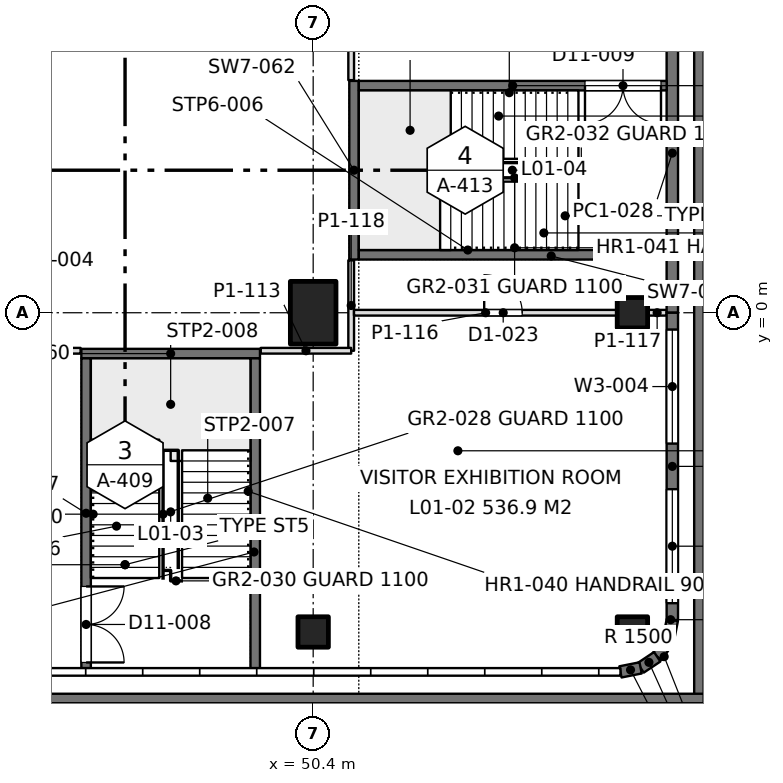
"""IFC4 building model, lengths in metres.
Left out: names, types, materials, properties, quantities, classifications, styles, units other than length and angle.
Written with IfcOpenShell. Run it as: python <this file> out.ifc"""

import sys

from ifc_helpers import new_model, si_unit, direction, frame, frame_2d, origin, origin_2d, place, context, subcontext, project, spatial, rectangle, extrude, element, fill, save


model = new_model("IFC4")
c1 = context("Model", 3, precision=1e-05, world=origin(), true_north=direction((0.0, 1.0)))
c2 = subcontext(c1, "Body", "Model", "MODEL_VIEW")
j1 = project(units=[si_unit("LENGTHUNIT", "METRE"), si_unit("PLANEANGLEUNIT", "RADIAN")], contexts=[c1])
p1 = place(None, origin())
s1 = spatial("IfcSite", under=j1, at=p1, CompositionType="ELEMENT")
p2 = place(p1, origin())
s2 = spatial("IfcBuilding", under=s1, at=p2, CompositionType="ELEMENT")
p3 = place(p2, frame((0.0, 0.0, 5.4)))
s3 = spatial("IfcBuildingStorey", under=s2, at=p3, CompositionType="ELEMENT", Elevation=5.4)
p4 = place(p3, frame((50.4, -8.4, 0.0), z_axis=(0.0, 0.0, 1.0), x_axis=(1.0, 0.0, 0.0)))
e1 = element("IfcColumn", 1, at=p4, inside=s3, PredefinedType="COLUMN", context=c2, shape_type="SweptSolid", body=[
    extrude(rectangle(XDim=0.8, YDim=0.8, at=origin_2d()), origin(), (0.0, 0.0, 1.0), 4.5),
])
p5 = place(p3, frame((50.4, 0.0, 0.0), z_axis=(0.0, 0.0, 1.0), x_axis=(1.0, 0.0, 0.0)))
e2 = element("IfcColumn", 2, at=p5, inside=s3, PredefinedType="COLUMN", context=c2, shape_type="SweptSolid", body=[
    extrude(rectangle(XDim=1.2, YDim=1.65, at=origin_2d()), origin(), (0.0, 0.0, 1.0), 4.5),
])
for number, where, z_axis, x_axis in (
    (3, (58.8, -8.4, 0.0), (0.0, 0.0, 1.0), (1.0, 0.0, 0.0)),
    (4, (58.8, 0.0, 0.0), (0.0, 0.0, 1.0), (1.0, 0.0, 0.0)),
):
    element("IfcColumn", number, at=place(p3, frame(where, z_axis=z_axis, x_axis=x_axis)), inside=s3, PredefinedType="COLUMN", context=c2, shape_type="SweptSolid", body=[
        extrude(rectangle(XDim=0.8, YDim=0.8, at=origin_2d()), origin(), (0.0, 0.0, 1.0), 4.5),
    ])
p6 = place(p3, frame((59.85, 8.4, 0.0), z_axis=(0.0, 0.0, 1.0), x_axis=(0.0, -1.0, 0.0)))
e5 = element("IfcWall", 5, at=p6, inside=s3, PredefinedType="SOLIDWALL", context=c2, shape_type="SweptSolid", body=[
    extrude(rectangle(XDim=8.4, YDim=0.3, at=frame_2d((4.2, 0.0))), origin(), (0.0, 0.0, 1.0), 4.3),
])
p7 = place(p3, frame((59.85, 0.0, 0.0), z_axis=(0.0, 0.0, 1.0), x_axis=(0.0, -1.0, 0.0)))
e6 = element("IfcWall", 6, at=p7, inside=s3, PredefinedType="SOLIDWALL", context=c2, shape_type="SweptSolid", body=[
    extrude(rectangle(XDim=8.085, YDim=0.3, at=frame_2d((4.042, 0.0))), origin(), (0.0, 0.0, 1.0), 4.3),
])
p8 = place(p7, frame((0.443, 0.0, 0.9)))
e7 = element("IfcOpeningElement", 7, at=p8, cuts=e6, PredefinedType="OPENING", context=c2, shape_type="SweptSolid", body=[
    extrude(rectangle(XDim=3.0, YDim=2.4, at=frame_2d((1.5, 1.2))), frame((0.0, 0.16, 0.0), z_axis=(0.0, -1.0, 0.0), x_axis=(1.0, 0.0, 0.0)), (0.0, 0.0, 1.0), 0.32),
])
p9 = place(p7, frame((4.643, 0.0, 0.9)))
e8 = element("IfcOpeningElement", 8, at=p9, cuts=e6, PredefinedType="OPENING", context=c2, shape_type="SweptSolid", body=[
    extrude(rectangle(XDim=3.0, YDim=2.4, at=frame_2d((1.5, 1.2))), frame((0.0, 0.16, 0.0), z_axis=(0.0, -1.0, 0.0), x_axis=(1.0, 0.0, 0.0)), (0.0, 0.0, 1.0), 0.32),
])
p10 = place(p3, frame((59.85, -8.085, 0.0), z_axis=(0.0, 0.0, 1.0), x_axis=(-0.1955082817, -0.980702050465, 0.0)))
e9 = element("IfcWall", 9, at=p10, inside=s3, PredefinedType="SOLIDWALL", context=c2, shape_type="SweptSolid", body=[
    extrude(rectangle(XDim=0.541, YDim=0.3, at=frame_2d((0.271, 0.0))), origin(), (0.0, 0.0, 1.0), 4.3),
])
p11 = place(p3, frame((59.744, -8.615, 0.0), z_axis=(0.0, 0.0, 1.0), x_axis=(-0.555236195849, -0.831692711774, 0.0)))
e10 = element("IfcWall", 10, at=p11, inside=s3, PredefinedType="SOLIDWALL", context=c2, shape_type="SweptSolid", body=[
    extrude(rectangle(XDim=0.525, YDim=0.3, at=frame_2d((0.263, 0.0))), origin(), (0.0, 0.0, 1.0), 4.3),
])
p12 = place(p3, frame((59.453, -9.052, 0.0), z_axis=(0.0, 0.0, 1.0), x_axis=(-0.831621430339, -0.55534295404, 0.0)))
e11 = element("IfcWall", 11, at=p12, inside=s3, PredefinedType="SOLIDWALL", context=c2, shape_type="SweptSolid", body=[
    extrude(rectangle(XDim=0.526, YDim=0.3, at=frame_2d((0.263, 0.0))), origin(), (0.0, 0.0, 1.0), 4.3),
])
p13 = place(p3, frame((59.015, -9.344, 0.0), z_axis=(0.0, 0.0, 1.0), x_axis=(-0.980788534345, -0.195073962632, 0.0)))
e12 = element("IfcWall", 12, at=p13, inside=s3, PredefinedType="SOLIDWALL", context=c2, shape_type="SweptSolid", body=[
    extrude(rectangle(XDim=0.541, YDim=0.3, at=frame_2d((0.271, 0.0))), origin(), (0.0, 0.0, 1.0), 4.3),
])
for number, where, z_axis, x_axis in (
    (13, (60.55, 60.675, 0.0), (0.0, 0.0, 1.0), (0.0, -1.0, 0.0)),
    (14, (60.675, -10.15, 0.0), (0.0, 0.0, 1.0), (-1.0, 0.0, 0.0)),
):
    element("IfcWall", number, at=place(p3, frame(where, z_axis=z_axis, x_axis=x_axis)), inside=s3, PredefinedType="PARAPET", context=c2, shape_type="SweptSolid", body=[
        extrude(rectangle(XDim=70.95, YDim=0.25, at=frame_2d((35.475, 0.0))), origin(), (0.0, 0.0, 1.0), 1.1),
    ])
p14 = place(p3, frame((6.12, -1.0, 0.0), z_axis=(0.0, 0.0, 1.0), x_axis=(1.0, 0.0, 0.0)))
e15 = element("IfcWall", 15, at=p14, inside=s3, PredefinedType="PARTITIONING", context=c2, shape_type="SweptSolid", body=[
    extrude(rectangle(XDim=38.16, YDim=0.15, at=frame_2d((19.08, 0.0))), origin(), (0.0, 0.0, 1.0), 3.7),
])
p15 = place(p14, frame((13.98, 0.0, 0.0)))
e16 = element("IfcOpeningElement", 16, at=p15, cuts=e15, PredefinedType="OPENING", context=c2, shape_type="SweptSolid", body=[
    extrude(rectangle(XDim=1.8, YDim=2.2, at=frame_2d((0.9, 1.1))), frame((0.0, 0.085, 0.0), z_axis=(0.0, -1.0, 0.0), x_axis=(1.0, 0.0, 0.0)), (0.0, 0.0, 1.0), 0.17),
])
p16 = place(p14, frame((22.38, 0.0, 0.0)))
e17 = element("IfcOpeningElement", 17, at=p16, cuts=e15, PredefinedType="OPENING", context=c2, shape_type="SweptSolid", body=[
    extrude(rectangle(XDim=1.8, YDim=2.2, at=frame_2d((0.9, 1.1))), frame((0.0, 0.085, 0.0), z_axis=(0.0, -1.0, 0.0), x_axis=(1.0, 0.0, 0.0)), (0.0, 0.0, 1.0), 0.17),
])
p17 = place(p3, frame((49.02, -1.0, 0.0), z_axis=(0.0, 0.0, 1.0), x_axis=(1.0, 0.0, 0.0)))
e18 = element("IfcWall", 18, at=p17, inside=s3, PredefinedType="PARTITIONING", context=c2, shape_type="SweptSolid", body=[
    extrude(rectangle(XDim=2.38, YDim=0.15, at=frame_2d((1.19, 0.0))), origin(), (0.0, 0.0, 1.0), 3.7),
])
p18 = place(p3, frame((51.474, 0.0, 0.0), z_axis=(0.0, 0.0, 1.0), x_axis=(1.0, 0.0, 0.0)))
e19 = element("IfcWall", 19, at=p18, inside=s3, PredefinedType="PARTITIONING", context=c2, shape_type="SweptSolid", body=[
    extrude(rectangle(XDim=6.927, YDim=0.15, at=frame_2d((3.463, 0.0))), origin(), (0.0, 0.0, 1.0), 3.7),
])
p19 = place(p18, frame((3.426, 0.0, 0.0)))
e20 = element("IfcOpeningElement", 20, at=p19, cuts=e19, PredefinedType="OPENING", context=c2, shape_type="SweptSolid", body=[
    extrude(rectangle(XDim=1.0, YDim=2.2, at=frame_2d((0.5, 1.1))), frame((0.0, 0.085, 0.0), z_axis=(0.0, -1.0, 0.0), x_axis=(1.0, 0.0, 0.0)), (0.0, 0.0, 1.0), 0.17),
])
p20 = place(p3, frame((59.199, 0.0, 0.0), z_axis=(0.0, 0.0, 1.0), x_axis=(1.0, 0.0, 0.0)))
e21 = element("IfcWall", 21, at=p20, inside=s3, PredefinedType="PARTITIONING", context=c2, shape_type="SweptSolid", body=[
    extrude(rectangle(XDim=0.503, YDim=0.15, at=frame_2d((0.251, 0.0))), origin(), (0.0, 0.0, 1.0), 4.3),
])
p21 = place(p3, frame((51.4, -1.0, 0.0), z_axis=(0.0, 0.0, 1.0), x_axis=(0.0, 1.0, 0.0)))
e22 = element("IfcWall", 22, at=p21, inside=s3, PredefinedType="PARTITIONING", context=c2, shape_type="SweptSolid", body=[
    extrude(rectangle(XDim=2.38, YDim=0.15, at=frame_2d((1.19, 0.0))), origin(), (0.0, 0.0, 1.0), 3.7),
])
p22 = place(p3, frame((51.4, 6.12, 0.0), z_axis=(0.0, 0.0, 1.0), x_axis=(0.0, 1.0, 0.0)))
e23 = element("IfcWall", 23, at=p22, inside=s3, PredefinedType="PARTITIONING", context=c2, shape_type="SweptSolid", body=[
    extrude(rectangle(XDim=6.482, YDim=0.15, at=frame_2d((3.241, 0.0))), origin(), (0.0, 0.0, 1.0), 3.7),
])
p23 = place(p22, frame((3.88, 0.0, 0.0)))
e24 = element("IfcOpeningElement", 24, at=p23, cuts=e23, PredefinedType="OPENING", context=c2, shape_type="SweptSolid", body=[
    extrude(rectangle(XDim=1.0, YDim=2.2, at=frame_2d((0.5, 1.1))), frame((0.0, 0.085, 0.0), z_axis=(0.0, -1.0, 0.0), x_axis=(1.0, 0.0, 0.0)), (0.0, 0.0, 1.0), 0.17),
])
p24 = place(p3, frame((44.425, -9.352, 0.0), z_axis=(0.0, 0.0, 1.0), x_axis=(0.0, 1.0, 0.0)))
e25 = element("IfcWall", 25, at=p24, inside=s3, PredefinedType="SOLIDWALL", context=c2, shape_type="SweptSolid", body=[
    extrude(rectangle(XDim=8.152, YDim=0.25, at=frame_2d((4.076, 0.0))), origin(), (0.0, 0.0, 1.0), 4.5),
])
p25 = place(p24, frame((0.15, 0.0, 0.0)))
e26 = element("IfcOpeningElement", 26, at=p25, cuts=e25, PredefinedType="OPENING", context=c2, shape_type="SweptSolid", body=[
    extrude(rectangle(XDim=2.0, YDim=2.2, at=frame_2d((1.0, 1.1))), frame((0.0, 0.135, 0.0), z_axis=(0.0, -1.0, 0.0), x_axis=(1.0, 0.0, 0.0)), (0.0, 0.0, 1.0), 0.27),
])
p26 = place(p3, frame((48.875, -9.352, 0.0), z_axis=(0.0, 0.0, 1.0), x_axis=(0.0, 1.0, 0.0)))
e27 = element("IfcWall", 27, at=p26, inside=s3, PredefinedType="SOLIDWALL", context=c2, shape_type="SweptSolid", body=[
    extrude(rectangle(XDim=8.152, YDim=0.25, at=frame_2d((4.076, 0.0))), origin(), (0.0, 0.0, 1.0), 4.5),
])
p27 = place(p3, frame((44.3, -1.075, 0.0), z_axis=(0.0, 0.0, 1.0), x_axis=(1.0, 0.0, 0.0)))
e28 = element("IfcWall", 28, at=p27, inside=s3, PredefinedType="SOLIDWALL", context=c2, shape_type="SweptSolid", body=[
    extrude(rectangle(XDim=4.7, YDim=0.25, at=frame_2d((2.35, 0.0))), origin(), (0.0, 0.0, 1.0), 4.5),
])
p28 = place(p3, frame((59.702, 1.525, 0.0), z_axis=(0.0, 0.0, 1.0), x_axis=(-1.0, 0.0, 0.0)))
e29 = element("IfcWall", 29, at=p28, inside=s3, PredefinedType="SOLIDWALL", context=c2, shape_type="SweptSolid", body=[
    extrude(rectangle(XDim=8.102, YDim=0.25, at=frame_2d((4.051, 0.0))), origin(), (0.0, 0.0, 1.0), 4.5),
])
p29 = place(p3, frame((59.702, 5.975, 0.0), z_axis=(0.0, 0.0, 1.0), x_axis=(-1.0, 0.0, 0.0)))
e30 = element("IfcWall", 30, at=p29, inside=s3, PredefinedType="SOLIDWALL", context=c2, shape_type="SweptSolid", body=[
    extrude(rectangle(XDim=8.102, YDim=0.25, at=frame_2d((4.051, 0.0))), origin(), (0.0, 0.0, 1.0), 4.5),
])
p30 = place(p29, frame((0.15, 0.0, 0.0)))
e31 = element("IfcOpeningElement", 31, at=p30, cuts=e30, PredefinedType="OPENING", context=c2, shape_type="SweptSolid", body=[
    extrude(rectangle(XDim=2.0, YDim=2.2, at=frame_2d((1.0, 1.1))), frame((0.0, 0.135, 0.0), z_axis=(0.0, -1.0, 0.0), x_axis=(1.0, 0.0, 0.0)), (0.0, 0.0, 1.0), 0.27),
])
p31 = place(p3, frame((51.475, 1.4, 0.0), z_axis=(0.0, 0.0, 1.0), x_axis=(0.0, 1.0, 0.0)))
e32 = element("IfcWall", 32, at=p31, inside=s3, PredefinedType="SOLIDWALL", context=c2, shape_type="SweptSolid", body=[
    extrude(rectangle(XDim=4.7, YDim=0.25, at=frame_2d((2.35, 0.0))), origin(), (0.0, 0.0, 1.0), 4.5),
])
p32 = place(p8, origin())
e33 = element("IfcWindow", 33, at=p32, inside=s3, PartitioningType="SINGLE_PANEL", PredefinedType="WINDOW", context=c2, shape_type="SweptSolid", body=[
    extrude(rectangle(XDim=3.0, YDim=2.4, at=frame_2d((1.5, 1.2))), frame((0.0, 0.03, 0.0), z_axis=(0.0, -1.0, 0.0), x_axis=(1.0, 0.0, 0.0)), (0.0, 0.0, 1.0), 0.06),
])
fill(e7, e33)
p33 = place(p9, origin())
e34 = element("IfcWindow", 34, at=p33, inside=s3, PartitioningType="SINGLE_PANEL", PredefinedType="WINDOW", context=c2, shape_type="SweptSolid", body=[
    extrude(rectangle(XDim=3.0, YDim=2.4, at=frame_2d((1.5, 1.2))), frame((0.0, 0.03, 0.0), z_axis=(0.0, -1.0, 0.0), x_axis=(1.0, 0.0, 0.0)), (0.0, 0.0, 1.0), 0.06),
])
fill(e8, e34)
p34 = place(p19, origin())
e35 = element("IfcDoor", 35, at=p34, inside=s3, OperationType="SINGLE_SWING_LEFT", PredefinedType="DOOR", context=c2, shape_type="SweptSolid", body=[
    extrude(rectangle(XDim=1.0, YDim=2.2, at=frame_2d((0.5, 1.1))), frame((0.0, 0.025, 0.0), z_axis=(0.0, -1.0, 0.0), x_axis=(1.0, 0.0, 0.0)), (0.0, 0.0, 1.0), 0.05),
])
fill(e20, e35)
p35 = place(p25, frame((2.0, 0.0, 0.0), z_axis=(0.0, 0.0, 1.0), x_axis=(-1.0, 0.0, 0.0)))
e36 = element("IfcDoor", 36, at=p35, inside=s3, OperationType="DOUBLE_DOOR_SINGLE_SWING", PredefinedType="DOOR", context=c2, shape_type="SweptSolid", body=[
    extrude(rectangle(XDim=2.0, YDim=2.2, at=frame_2d((1.0, 1.1))), frame((0.0, 0.025, 0.0), z_axis=(0.0, -1.0, 0.0), x_axis=(1.0, 0.0, 0.0)), (0.0, 0.0, 1.0), 0.05),
])
fill(e26, e36)
p36 = place(p30, origin())
e37 = element("IfcDoor", 37, at=p36, inside=s3, OperationType="DOUBLE_DOOR_SINGLE_SWING", PredefinedType="DOOR", context=c2, shape_type="SweptSolid", body=[
    extrude(rectangle(XDim=2.0, YDim=2.2, at=frame_2d((1.0, 1.1))), frame((0.0, 0.025, 0.0), z_axis=(0.0, -1.0, 0.0), x_axis=(1.0, 0.0, 0.0)), (0.0, 0.0, 1.0), 0.05),
])
fill(e31, e37)
save(model, sys.argv[1])
